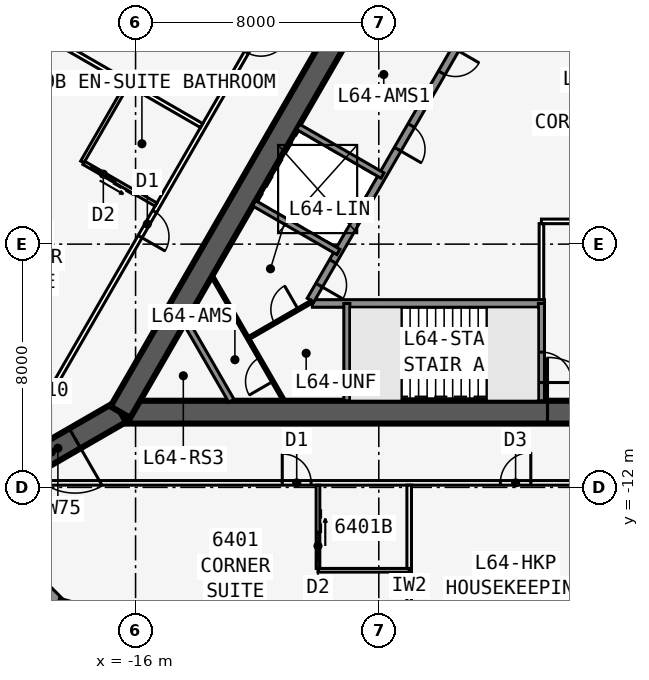
"""IFC4 building model, lengths in metres.
Left out: names, types, materials, properties, quantities, classifications, styles, units other than length and angle.
Written with IfcOpenShell. Run it as: python <this file> out.ifc"""

import sys

from ifc_helpers import new_model, si_unit, direction, frame, frame_2d, origin, place, context, subcontext, project, spatial, polyline, rectangle, outline, extrude, element, fill, save


model = new_model("IFC4")
c1 = context("Model", 3, precision=1e-05, world=origin(), true_north=direction((0.0, 1.0)))
c2 = subcontext(c1, "Body", "Model", "MODEL_VIEW")
j1 = project(units=[si_unit("LENGTHUNIT", "METRE"), si_unit("PLANEANGLEUNIT", "RADIAN")], contexts=[c1])
p1 = place(None, origin())
s1 = spatial("IfcSite", under=j1, at=p1, CompositionType="ELEMENT")
p2 = place(p1, origin())
s2 = spatial("IfcBuilding", under=s1, at=p2, CompositionType="ELEMENT")
p3 = place(p2, frame((0.0, 0.0, 242.9)))
s3 = spatial("IfcBuildingStorey", under=s2, at=p3, CompositionType="ELEMENT", Elevation=242.9)
p4 = place(p3, frame((-16.5, -9.526, 0.0), z_axis=(0.0, 0.0, 1.0), x_axis=(1.0, 0.0, 0.0)))
e1 = element("IfcWall", 1, at=p4, inside=s3, PredefinedType="SHEAR", context=c2, shape_type="SweptSolid", body=[
    extrude(rectangle(XDim=33.0, YDim=0.75, at=frame_2d((16.5, 0.0))), origin(), (0.0, 0.0, 1.0), 3.6),
])
p5 = place(p4, frame((14.05, 0.0, 0.0)))
e2 = element("IfcOpeningElement", 2, at=p5, cuts=e1, PredefinedType="OPENING", context=c2, shape_type="SweptSolid", body=[
    extrude(rectangle(XDim=1.8, YDim=2.13, at=frame_2d((0.9, 1.065))), frame((0.0, 0.385, 0.0), z_axis=(0.0, -1.0, 0.0), x_axis=(1.0, 0.0, 0.0)), (0.0, 0.0, 1.0), 0.77),
])
p6 = place(p3, frame((-10.183, -5.951, 0.0), z_axis=(0.0, 0.0, 1.0), x_axis=(1.0, 0.0, 0.0)))
e3 = element("IfcWall", 3, at=p6, inside=s3, PredefinedType="SOLIDWALL", context=c2, shape_type="SweptSolid", body=[
    extrude(rectangle(XDim=7.633, YDim=0.25, at=frame_2d((3.816, 0.0))), origin(), (0.0, 0.0, 1.0), 3.435),
])
p7 = place(p3, frame((-9.05, -5.951, 0.0), z_axis=(0.0, 0.0, 1.0), x_axis=(0.0, -1.0, 0.0)))
e4 = element("IfcWall", 4, at=p7, inside=s3, PredefinedType="SOLIDWALL", context=c2, shape_type="SweptSolid", body=[
    extrude(rectangle(XDim=3.2, YDim=0.2, at=frame_2d((1.6, 0.0))), origin(), (0.0, 0.0, 1.0), 3.435),
])
p8 = place(p3, frame((-2.65, -5.951, 0.0), z_axis=(0.0, 0.0, 1.0), x_axis=(0.0, -1.0, 0.0)))
e5 = element("IfcWall", 5, at=p8, inside=s3, PredefinedType="SOLIDWALL", context=c2, shape_type="SweptSolid", body=[
    extrude(rectangle(XDim=3.2, YDim=0.2, at=frame_2d((1.6, 0.0))), origin(), (0.0, 0.0, 1.0), 3.435),
])
p9 = place(p8, frame((1.6, 0.0, 0.0)))
e6 = element("IfcOpeningElement", 6, at=p9, cuts=e5, PredefinedType="OPENING", context=c2, shape_type="SweptSolid", body=[
    extrude(rectangle(XDim=1.0, YDim=2.13, at=frame_2d((0.5, 1.065))), frame((0.0, 0.11, 0.0), z_axis=(0.0, -1.0, 0.0), x_axis=(1.0, 0.0, 0.0)), (0.0, 0.0, 1.0), 0.22),
])
p10 = place(p3, frame((0.0, 19.052, 0.0), z_axis=(0.0, 0.0, 1.0), x_axis=(-0.499999749417, -0.866025548458, 0.0)))
e7 = element("IfcWall", 7, at=p10, inside=s3, PredefinedType="SHEAR", context=c2, shape_type="SweptSolid", body=[
    extrude(rectangle(XDim=33.0, YDim=0.75, at=frame_2d((16.5, 0.0))), origin(), (0.0, 0.0, 1.0), 3.6),
])
p11 = place(p10, frame((14.15, 0.0, 0.0)))
e8 = element("IfcOpeningElement", 8, at=p11, cuts=e7, PredefinedType="OPENING", context=c2, shape_type="SweptSolid", body=[
    extrude(rectangle(XDim=1.8, YDim=2.13, at=frame_2d((0.9, 1.065))), frame((0.0, 0.385, 0.0), z_axis=(0.0, -1.0, 0.0), x_axis=(1.0, 0.0, 0.0)), (0.0, 0.0, 1.0), 0.77),
])
p12 = place(p10, frame((12.6, 0.0, 0.0)))
e9 = element("IfcOpeningElement", 9, at=p12, cuts=e7, PredefinedType="OPENING", context=c2, shape_type="SweptSolid", body=[
    extrude(rectangle(XDim=1.0, YDim=2.13, at=frame_2d((0.5, 1.065))), frame((0.0, 0.385, 0.0), z_axis=(0.0, -1.0, 0.0), x_axis=(1.0, 0.0, 0.0)), (0.0, 0.0, 1.0), 0.77),
])
p13 = place(p3, frame((-4.929, 3.365, 0.0), z_axis=(0.0, 0.0, 1.0), x_axis=(-0.499991433582, -0.866030349552, 0.0)))
e10 = element("IfcWall", 10, at=p13, inside=s3, PredefinedType="SOLIDWALL", context=c2, shape_type="SweptSolid", body=[
    extrude(rectangle(XDim=10.633, YDim=0.25, at=frame_2d((5.316, 0.0))), origin(), (0.0, 0.0, 1.0), 3.435),
])
p14 = place(p13, frame((9.164, 0.0, 0.0)))
e11 = element("IfcOpeningElement", 11, at=p14, cuts=e10, PredefinedType="OPENING", context=c2, shape_type="SweptSolid", body=[
    extrude(rectangle(XDim=0.9, YDim=2.13, at=frame_2d((0.45, 1.065))), frame((0.0, 0.135, 0.0), z_axis=(0.0, -1.0, 0.0), x_axis=(1.0, 0.0, 0.0)), (0.0, 0.0, 1.0), 0.27),
])
p15 = place(p13, frame((1.1, 0.0, 0.0)))
e12 = element("IfcOpeningElement", 12, at=p15, cuts=e10, PredefinedType="OPENING", context=c2, shape_type="SweptSolid", body=[
    extrude(rectangle(XDim=0.9, YDim=2.13, at=frame_2d((0.45, 1.065))), frame((0.0, 0.135, 0.0), z_axis=(0.0, -1.0, 0.0), x_axis=(1.0, 0.0, 0.0)), (0.0, 0.0, 1.0), 0.27),
])
p16 = place(p13, frame((4.0, 0.0, 0.0)))
e13 = element("IfcOpeningElement", 13, at=p16, cuts=e10, PredefinedType="OPENING", context=c2, shape_type="SweptSolid", body=[
    extrude(rectangle(XDim=0.9, YDim=2.13, at=frame_2d((0.45, 1.065))), frame((0.0, 0.135, 0.0), z_axis=(0.0, -1.0, 0.0), x_axis=(1.0, 0.0, 0.0)), (0.0, 0.0, 1.0), 0.27),
])
p17 = place(p3, frame((-7.879, -1.744, 0.0), z_axis=(0.0, 0.0, 1.0), x_axis=(-0.866042017984, 0.499971222258, 0.0)))
e14 = element("IfcWall", 14, at=p17, inside=s3, PredefinedType="SOLIDWALL", context=c2, shape_type="SweptSolid", body=[
    extrude(rectangle(XDim=3.2, YDim=0.2, at=frame_2d((1.6, 0.0))), origin(), (0.0, 0.0, 1.0), 3.435),
])
p18 = place(p3, frame((-9.329, -4.256, 0.0), z_axis=(0.0, 0.0, 1.0), x_axis=(-0.866022944154, 0.50000426018, 0.0)))
e15 = element("IfcWall", 15, at=p18, inside=s3, PredefinedType="SOLIDWALL", context=c2, shape_type="SweptSolid", body=[
    extrude(rectangle(XDim=3.2, YDim=0.2, at=frame_2d((1.6, 0.0))), origin(), (0.0, 0.0, 1.0), 3.435),
])
p19 = place(p3, frame((-16.5, -9.526, 0.0), z_axis=(0.0, 0.0, 1.0), x_axis=(-0.866031398331, -0.499989616998, 0.0)))
e16 = element("IfcWall", 16, at=p19, inside=s3, PredefinedType="SHEAR", context=c2, shape_type="SweptSolid", body=[
    extrude(rectangle(XDim=4.746, YDim=0.75, at=frame_2d((2.373, 0.0))), origin(), (0.0, 0.0, 1.0), 3.6),
])
p20 = place(p19, frame((1.725, 0.0, 0.0)))
e17 = element("IfcOpeningElement", 17, at=p20, cuts=e16, PredefinedType="OPENING", context=c2, shape_type="SweptSolid", body=[
    extrude(rectangle(XDim=1.8, YDim=2.13, at=frame_2d((0.9, 1.065))), frame((0.0, 0.385, 0.0), z_axis=(0.0, -1.0, 0.0), x_axis=(1.0, 0.0, 0.0)), (0.0, 0.0, 1.0), 0.77),
])
p21 = place(p3, frame((-21.841, -12.542, 0.0), z_axis=(0.0, 0.0, 1.0), x_axis=(0.707081252484, -0.707132308968, 0.0)))
e18 = element("IfcWall", 18, at=p21, inside=s3, PredefinedType="SOLIDWALL", context=c2, shape_type="SweptSolid", body=[
    extrude(outline(polyline([(4.782, 0.225), (0.509, 0.225), (0.479, 0.113), (0.059, 0.225), (0.0, 0.225), (0.0, -0.225), (4.782, -0.225), (4.782, 0.225)])), origin(), (0.0, 0.0, 1.0), 3.435),
])
p22 = place(p21, frame((1.07, 0.0, 0.45)))
e19 = element("IfcOpeningElement", 19, at=p22, cuts=e18, PredefinedType="OPENING", context=c2, shape_type="SweptSolid", body=[
    extrude(rectangle(XDim=3.0, YDim=2.6, at=frame_2d((1.5, 1.3))), frame((0.0, 0.235, 0.0), z_axis=(0.0, -1.0, 0.0), x_axis=(1.0, 0.0, 0.0)), (0.0, 0.0, 1.0), 0.47),
])
p23 = place(p3, frame((-18.561, -15.865, 0.0), z_axis=(0.0, 0.0, 1.0), x_axis=(0.965913862671, -0.258863689806, 0.0)))
e20 = element("IfcWall", 20, at=p23, inside=s3, PredefinedType="SOLIDWALL", context=c2, shape_type="SweptSolid", body=[
    extrude(rectangle(XDim=4.782, YDim=0.45, at=frame_2d((2.391, 0.0))), origin(), (0.0, 0.0, 1.0), 3.435),
])
p24 = place(p23, frame((0.591, 0.0, 0.45)))
e21 = element("IfcOpeningElement", 21, at=p24, cuts=e20, PredefinedType="OPENING", context=c2, shape_type="SweptSolid", body=[
    extrude(rectangle(XDim=3.6, YDim=2.6, at=frame_2d((1.8, 1.3))), frame((0.0, 0.235, 0.0), z_axis=(0.0, -1.0, 0.0), x_axis=(1.0, 0.0, 0.0)), (0.0, 0.0, 1.0), 0.47),
])
p25 = place(p3, frame((-19.677, -11.851, 0.0), z_axis=(0.0, 0.0, 1.0), x_axis=(1.0, 0.0, 0.0)))
e22 = element("IfcWall", 22, at=p25, inside=s3, PredefinedType="PARTITIONING", context=c2, shape_type="SweptSolid", body=[
    extrude(rectangle(XDim=39.354, YDim=0.15, at=frame_2d((19.677, 0.0))), origin(), (0.0, 0.0, 1.0), 3.435),
])
p26 = place(p25, frame((8.502, 0.0, 0.0)))
e23 = element("IfcOpeningElement", 23, at=p26, cuts=e22, PredefinedType="OPENING", context=c2, shape_type="SweptSolid", body=[
    extrude(rectangle(XDim=0.95, YDim=2.13, at=frame_2d((0.475, 1.065))), frame((0.0, 0.085, 0.0), z_axis=(0.0, -1.0, 0.0), x_axis=(1.0, 0.0, 0.0)), (0.0, 0.0, 1.0), 0.17),
])
p27 = place(p25, frame((15.677, 0.0, 0.0)))
e24 = element("IfcOpeningElement", 24, at=p27, cuts=e22, PredefinedType="OPENING", context=c2, shape_type="SweptSolid", body=[
    extrude(rectangle(XDim=1.0, YDim=2.13, at=frame_2d((0.5, 1.065))), frame((0.0, 0.085, 0.0), z_axis=(0.0, -1.0, 0.0), x_axis=(1.0, 0.0, 0.0)), (0.0, 0.0, 1.0), 0.17),
])
p28 = place(p25, frame((22.902, 0.0, 0.0)))
e25 = element("IfcOpeningElement", 25, at=p28, cuts=e22, PredefinedType="OPENING", context=c2, shape_type="SweptSolid", body=[
    extrude(rectangle(XDim=0.95, YDim=2.13, at=frame_2d((0.475, 1.065))), frame((0.0, 0.085, 0.0), z_axis=(0.0, -1.0, 0.0), x_axis=(1.0, 0.0, 0.0)), (0.0, 0.0, 1.0), 0.17),
])
p29 = place(p25, frame((29.902, 0.0, 0.0)))
e26 = element("IfcOpeningElement", 26, at=p29, cuts=e22, PredefinedType="OPENING", context=c2, shape_type="SweptSolid", body=[
    extrude(rectangle(XDim=0.95, YDim=2.13, at=frame_2d((0.475, 1.065))), frame((0.0, 0.085, 0.0), z_axis=(0.0, -1.0, 0.0), x_axis=(1.0, 0.0, 0.0)), (0.0, 0.0, 1.0), 0.17),
])
p30 = place(p3, frame((-7.0, -11.926, 0.0), z_axis=(0.0, 0.0, 1.0), x_axis=(0.0, -1.0, 0.0)))
e27 = element("IfcWall", 27, at=p30, inside=s3, PredefinedType="PARTITIONING", context=c2, shape_type="SweptSolid", body=[
    extrude(rectangle(XDim=6.609, YDim=0.15, at=frame_2d((3.304, 0.0))), origin(), (0.0, 0.0, 1.0), 2.678),
])
p31 = place(p3, frame((-10.0, -14.726, 0.0), z_axis=(0.0, 0.0, 1.0), x_axis=(1.0, 0.0, 0.0)))
e28 = element("IfcWall", 28, at=p31, inside=s3, PredefinedType="PLUMBINGWALL", context=c2, shape_type="SweptSolid", body=[
    extrude(rectangle(XDim=3.0, YDim=0.12, at=frame_2d((1.5, 0.0))), origin(), (0.0, 0.0, 1.0), 3.435),
])
p32 = place(p3, frame((-10.0, -11.926, 0.0), z_axis=(0.0, 0.0, 1.0), x_axis=(0.0, -1.0, 0.0)))
e29 = element("IfcWall", 29, at=p32, inside=s3, PredefinedType="PLUMBINGWALL", context=c2, shape_type="SweptSolid", body=[
    extrude(rectangle(XDim=2.74, YDim=0.12, at=frame_2d((1.37, 0.0))), origin(), (0.0, 0.0, 1.0), 3.435),
])
p33 = place(p32, frame((1.55, 0.0, 0.0)))
e30 = element("IfcOpeningElement", 30, at=p33, cuts=e29, PredefinedType="OPENING", context=c2, shape_type="SweptSolid", body=[
    extrude(rectangle(XDim=0.9, YDim=2.13, at=frame_2d((0.45, 1.065))), frame((0.0, 0.07, 0.0), z_axis=(0.0, -1.0, 0.0), x_axis=(1.0, 0.0, 0.0)), (0.0, 0.0, 1.0), 0.14),
])
p34 = place(p3, frame((-0.425, 22.966, 0.0), z_axis=(0.0, 0.0, 1.0), x_axis=(-0.500000265775, -0.866025250339, 0.0)))
e31 = element("IfcWall", 31, at=p34, inside=s3, PredefinedType="PARTITIONING", context=c2, shape_type="SweptSolid", body=[
    extrude(rectangle(XDim=39.354, YDim=0.15, at=frame_2d((19.677, 0.0))), origin(), (0.0, 0.0, 1.0), 3.435),
])
p35 = place(p34, frame((8.502, 0.0, 0.0)))
e32 = element("IfcOpeningElement", 32, at=p35, cuts=e31, PredefinedType="OPENING", context=c2, shape_type="SweptSolid", body=[
    extrude(rectangle(XDim=0.95, YDim=2.13, at=frame_2d((0.475, 1.065))), frame((0.0, 0.085, 0.0), z_axis=(0.0, -1.0, 0.0), x_axis=(1.0, 0.0, 0.0)), (0.0, 0.0, 1.0), 0.17),
])
p36 = place(p34, frame((15.902, 0.0, 0.0)))
e33 = element("IfcOpeningElement", 33, at=p36, cuts=e31, PredefinedType="OPENING", context=c2, shape_type="SweptSolid", body=[
    extrude(rectangle(XDim=0.95, YDim=2.13, at=frame_2d((0.475, 1.065))), frame((0.0, 0.085, 0.0), z_axis=(0.0, -1.0, 0.0), x_axis=(1.0, 0.0, 0.0)), (0.0, 0.0, 1.0), 0.17),
])
p37 = place(p34, frame((22.902, 0.0, 0.0)))
e34 = element("IfcOpeningElement", 34, at=p37, cuts=e31, PredefinedType="OPENING", context=c2, shape_type="SweptSolid", body=[
    extrude(rectangle(XDim=0.95, YDim=2.13, at=frame_2d((0.475, 1.065))), frame((0.0, 0.085, 0.0), z_axis=(0.0, -1.0, 0.0), x_axis=(1.0, 0.0, 0.0)), (0.0, 0.0, 1.0), 0.17),
])
p38 = place(p34, frame((29.902, 0.0, 0.0)))
e35 = element("IfcOpeningElement", 35, at=p38, cuts=e31, PredefinedType="OPENING", context=c2, shape_type="SweptSolid", body=[
    extrude(rectangle(XDim=0.95, YDim=2.13, at=frame_2d((0.475, 1.065))), frame((0.0, 0.085, 0.0), z_axis=(0.0, -1.0, 0.0), x_axis=(1.0, 0.0, 0.0)), (0.0, 0.0, 1.0), 0.17),
])
p39 = place(p3, frame((-13.829, -0.099, 0.0), z_axis=(0.0, 0.0, 1.0), x_axis=(-0.866022562216, 0.500004921708, 0.0)))
e36 = element("IfcWall", 36, at=p39, inside=s3, PredefinedType="PARTITIONING", context=c2, shape_type="SweptSolid", body=[
    extrude(rectangle(XDim=6.609, YDim=0.15, at=frame_2d((3.304, 0.0))), origin(), (0.0, 0.0, 1.0), 2.678),
])
p40 = place(p3, frame((-16.253, 1.301, 0.0), z_axis=(0.0, 0.0, 1.0), x_axis=(-0.499990139034, -0.866031096941, 0.0)))
e37 = element("IfcWall", 37, at=p40, inside=s3, PredefinedType="PLUMBINGWALL", context=c2, shape_type="SweptSolid", body=[
    extrude(rectangle(XDim=3.0, YDim=0.12, at=frame_2d((1.5, 0.0))), origin(), (0.0, 0.0, 1.0), 3.435),
])
p41 = place(p3, frame((-15.329, -2.697, 0.0), z_axis=(0.0, 0.0, 1.0), x_axis=(-0.866035715982, 0.499982138324, 0.0)))
e38 = element("IfcWall", 38, at=p41, inside=s3, PredefinedType="PLUMBINGWALL", context=c2, shape_type="SweptSolid", body=[
    extrude(rectangle(XDim=2.74, YDim=0.12, at=frame_2d((1.37, 0.0))), origin(), (0.0, 0.0, 1.0), 3.435),
])
p42 = place(p41, frame((1.55, 0.0, 0.0)))
e39 = element("IfcOpeningElement", 39, at=p42, cuts=e38, PredefinedType="OPENING", context=c2, shape_type="SweptSolid", body=[
    extrude(rectangle(XDim=0.9, YDim=2.13, at=frame_2d((0.45, 1.065))), frame((0.0, 0.07, 0.0), z_axis=(0.0, -1.0, 0.0), x_axis=(1.0, 0.0, 0.0)), (0.0, 0.0, 1.0), 0.14),
])
p43 = place(p3, frame((-2.65, -3.251, 0.0), z_axis=(0.0, 0.0, 1.0), x_axis=(1.0, 0.0, 0.0)))
e40 = element("IfcWall", 40, at=p43, inside=s3, PredefinedType="PARTITIONING", context=c2, shape_type="SweptSolid", body=[
    extrude(rectangle(XDim=8.35, YDim=0.15, at=frame_2d((4.175, 0.0))), origin(), (0.0, 0.0, 1.0), 3.435),
])
p44 = place(p3, frame((-2.65, -5.826, 0.0), z_axis=(0.0, 0.0, 1.0), x_axis=(0.0, 1.0, 0.0)))
e41 = element("IfcWall", 41, at=p44, inside=s3, PredefinedType="PARTITIONING", context=c2, shape_type="SweptSolid", body=[
    extrude(rectangle(XDim=2.5, YDim=0.15, at=frame_2d((1.25, 0.0))), origin(), (0.0, 0.0, 1.0), 3.435),
])
p45 = place(p3, frame((-12.848, -9.151, 0.0), z_axis=(0.0, 0.0, 1.0), x_axis=(-0.499952404951, 0.866052881055, 0.0)))
e42 = element("IfcWall", 42, at=p45, inside=s3, PredefinedType="SOLIDWALL", context=c2, shape_type="SweptSolid", body=[
    extrude(rectangle(XDim=3.002, YDim=0.2, at=frame_2d((1.501, 0.0))), origin(), (0.0, 0.0, 1.0), 3.435),
])
p46 = place(p3, frame((-11.116, -9.151, 0.0), z_axis=(0.0, 0.0, 1.0), x_axis=(-0.499999210213, 0.866025859768, 0.0)))
e43 = element("IfcWall", 43, at=p46, inside=s3, PredefinedType="PARTITIONING", context=c2, shape_type="SweptSolid", body=[
    extrude(rectangle(XDim=4.734, YDim=0.1, at=frame_2d((2.367, 0.0))), origin(), (0.0, 0.0, 1.0), 3.435),
])
p47 = place(p46, frame((0.734, 0.0, 0.0)))
e44 = element("IfcOpeningElement", 44, at=p47, cuts=e43, PredefinedType="OPENING", context=c2, shape_type="SweptSolid", body=[
    extrude(rectangle(XDim=0.9, YDim=2.13, at=frame_2d((0.45, 1.065))), frame((0.0, 0.06, 0.0), z_axis=(0.0, -1.0, 0.0), x_axis=(1.0, 0.0, 0.0)), (0.0, 0.0, 1.0), 0.12),
])
p48 = place(p3, frame((-12.3, -7.101, 0.0), z_axis=(0.0, 0.0, 1.0), x_axis=(0.866022978719, 0.500004200313, 0.0)))
e45 = element("IfcWall", 45, at=p48, inside=s3, PredefinedType="PARTITIONING", context=c2, shape_type="SweptSolid", body=[
    extrude(rectangle(XDim=2.425, YDim=0.1, at=frame_2d((1.213, 0.0))), origin(), (0.0, 0.0, 1.0), 3.435),
])
p49 = place(p48, frame((1.005, 0.0, 0.0)))
e46 = element("IfcOpeningElement", 46, at=p49, cuts=e45, PredefinedType="OPENING", context=c2, shape_type="SweptSolid", body=[
    extrude(rectangle(XDim=0.9, YDim=2.13, at=frame_2d((0.45, 1.065))), frame((0.0, 0.06, 0.0), z_axis=(0.0, -1.0, 0.0), x_axis=(1.0, 0.0, 0.0)), (0.0, 0.0, 1.0), 0.12),
])
p50 = place(p3, frame((-7.247, -7.576, 0.0), z_axis=(0.0, 0.0, 1.0), x_axis=(1.0, 0.0, 0.0)))
e47 = element("IfcWall", 47, at=p50, inside=s3, PredefinedType="SOLIDWALL", context=c2, shape_type="SweptSolid", body=[
    extrude(rectangle(XDim=2.794, YDim=0.1, at=frame_2d((1.397, 0.0))), origin(), (0.0, 0.0, 1.0), 3.6),
])
p51 = place(p33, origin())
e48 = element("IfcDoor", 48, at=p51, inside=s3, OperationType="SLIDING_TO_LEFT", PredefinedType="DOOR", context=c2, shape_type="SweptSolid", body=[
    extrude(rectangle(XDim=0.9, YDim=2.13, at=frame_2d((0.45, 1.065))), frame((0.0, 0.025, 0.0), z_axis=(0.0, -1.0, 0.0), x_axis=(1.0, 0.0, 0.0)), (0.0, 0.0, 1.0), 0.05),
])
fill(e30, e48)
p52 = place(p26, origin())
e49 = element("IfcDoor", 49, at=p52, inside=s3, OperationType="SINGLE_SWING_LEFT", PredefinedType="DOOR", context=c2, shape_type="SweptSolid", body=[
    extrude(rectangle(XDim=0.95, YDim=2.13, at=frame_2d((0.475, 1.065))), frame((0.0, 0.025, 0.0), z_axis=(0.0, -1.0, 0.0), x_axis=(1.0, 0.0, 0.0)), (0.0, 0.0, 1.0), 0.05),
])
fill(e23, e49)
p53 = place(p27, origin())
e50 = element("IfcDoor", 50, at=p53, inside=s3, OperationType="SINGLE_SWING_RIGHT", PredefinedType="DOOR", context=c2, shape_type="SweptSolid", body=[
    extrude(rectangle(XDim=1.0, YDim=2.13, at=frame_2d((0.5, 1.065))), frame((0.0, 0.025, 0.0), z_axis=(0.0, -1.0, 0.0), x_axis=(1.0, 0.0, 0.0)), (0.0, 0.0, 1.0), 0.05),
])
fill(e24, e50)
p54 = place(p37, origin())
e51 = element("IfcDoor", 51, at=p54, inside=s3, OperationType="SINGLE_SWING_LEFT", PredefinedType="DOOR", context=c2, shape_type="SweptSolid", body=[
    extrude(rectangle(XDim=0.95, YDim=2.13, at=frame_2d((0.475, 1.065))), frame((0.0, 0.025, 0.0), z_axis=(0.0, -1.0, 0.0), x_axis=(1.0, 0.0, 0.0)), (0.0, 0.0, 1.0), 0.05),
])
fill(e34, e51)
p55 = place(p42, origin())
e52 = element("IfcDoor", 52, at=p55, inside=s3, OperationType="SLIDING_TO_LEFT", PredefinedType="DOOR", context=c2, shape_type="SweptSolid", body=[
    extrude(rectangle(XDim=0.9, YDim=2.13, at=frame_2d((0.45, 1.065))), frame((0.0, 0.025, 0.0), z_axis=(0.0, -1.0, 0.0), x_axis=(1.0, 0.0, 0.0)), (0.0, 0.0, 1.0), 0.05),
])
fill(e39, e52)
p56 = place(p38, origin())
e53 = element("IfcDoor", 53, at=p56, inside=s3, OperationType="SINGLE_SWING_RIGHT", PredefinedType="DOOR", context=c2, shape_type="SweptSolid", body=[
    extrude(rectangle(XDim=0.95, YDim=2.13, at=frame_2d((0.475, 1.065))), frame((0.0, 0.025, 0.0), z_axis=(0.0, -1.0, 0.0), x_axis=(1.0, 0.0, 0.0)), (0.0, 0.0, 1.0), 0.05),
])
fill(e35, e53)
p57 = place(p5, origin())
e54 = element("IfcDoor", 54, at=p57, inside=s3, OperationType="DOUBLE_DOOR_SINGLE_SWING", PredefinedType="DOOR", context=c2, shape_type="SweptSolid", body=[
    extrude(rectangle(XDim=1.8, YDim=2.13, at=frame_2d((0.9, 1.065))), frame((0.0, 0.025, 0.0), z_axis=(0.0, -1.0, 0.0), x_axis=(1.0, 0.0, 0.0)), (0.0, 0.0, 1.0), 0.05),
])
fill(e2, e54)
p58 = place(p9, origin())
e55 = element("IfcDoor", 55, at=p58, inside=s3, OperationType="SINGLE_SWING_RIGHT", PredefinedType="DOOR", context=c2, shape_type="SweptSolid", body=[
    extrude(rectangle(XDim=1.0, YDim=2.13, at=frame_2d((0.5, 1.065))), frame((0.0, 0.025, 0.0), z_axis=(0.0, -1.0, 0.0), x_axis=(1.0, 0.0, 0.0)), (0.0, 0.0, 1.0), 0.05),
])
fill(e6, e55)
p59 = place(p20, origin())
e56 = element("IfcDoor", 56, at=p59, inside=s3, OperationType="DOUBLE_DOOR_DOUBLE_SWING", PredefinedType="DOOR", context=c2, shape_type="SweptSolid", body=[
    extrude(rectangle(XDim=1.8, YDim=2.13, at=frame_2d((0.9, 1.065))), frame((0.0, 0.025, 0.0), z_axis=(0.0, -1.0, 0.0), x_axis=(1.0, 0.0, 0.0)), (0.0, 0.0, 1.0), 0.05),
])
fill(e17, e56)
p60 = place(p47, origin())
e57 = element("IfcDoor", 57, at=p60, inside=s3, OperationType="SINGLE_SWING_LEFT", PredefinedType="DOOR", context=c2, shape_type="SweptSolid", body=[
    extrude(rectangle(XDim=0.9, YDim=2.13, at=frame_2d((0.45, 1.065))), frame((0.0, 0.025, 0.0), z_axis=(0.0, -1.0, 0.0), x_axis=(1.0, 0.0, 0.0)), (0.0, 0.0, 1.0), 0.05),
])
fill(e44, e57)
p61 = place(p14, origin())
e58 = element("IfcDoor", 58, at=p61, inside=s3, OperationType="SINGLE_SWING_RIGHT", PredefinedType="DOOR", context=c2, shape_type="SweptSolid", body=[
    extrude(rectangle(XDim=0.9, YDim=2.13, at=frame_2d((0.45, 1.065))), frame((0.0, 0.025, 0.0), z_axis=(0.0, -1.0, 0.0), x_axis=(1.0, 0.0, 0.0)), (0.0, 0.0, 1.0), 0.05),
])
fill(e11, e58)
p62 = place(p49, origin())
e59 = element("IfcDoor", 59, at=p62, inside=s3, OperationType="SINGLE_SWING_RIGHT", PredefinedType="DOOR", context=c2, shape_type="SweptSolid", body=[
    extrude(rectangle(XDim=0.9, YDim=2.13, at=frame_2d((0.45, 1.065))), frame((0.0, 0.025, 0.0), z_axis=(0.0, -1.0, 0.0), x_axis=(1.0, 0.0, 0.0)), (0.0, 0.0, 1.0), 0.05),
])
fill(e46, e59)
p63 = place(p15, origin())
e60 = element("IfcDoor", 60, at=p63, inside=s3, OperationType="SINGLE_SWING_LEFT", PredefinedType="DOOR", context=c2, shape_type="SweptSolid", body=[
    extrude(rectangle(XDim=0.9, YDim=2.13, at=frame_2d((0.45, 1.065))), frame((0.0, 0.025, 0.0), z_axis=(0.0, -1.0, 0.0), x_axis=(1.0, 0.0, 0.0)), (0.0, 0.0, 1.0), 0.05),
])
fill(e12, e60)
p64 = place(p16, origin())
e61 = element("IfcDoor", 61, at=p64, inside=s3, OperationType="SINGLE_SWING_RIGHT", PredefinedType="DOOR", context=c2, shape_type="SweptSolid", body=[
    extrude(rectangle(XDim=0.9, YDim=2.13, at=frame_2d((0.45, 1.065))), frame((0.0, 0.025, 0.0), z_axis=(0.0, -1.0, 0.0), x_axis=(1.0, 0.0, 0.0)), (0.0, 0.0, 1.0), 0.05),
])
fill(e13, e61)
save(model, sys.argv[1])
